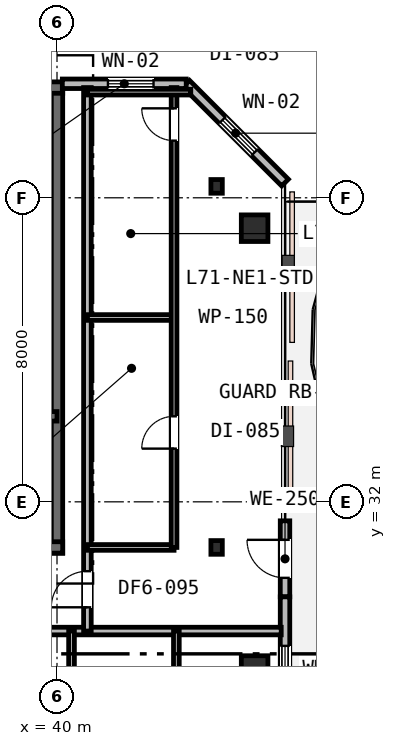
"""IFC4 building model, lengths in metres.
Left out: names, types, materials, properties, quantities, classifications, styles, units other than length and angle.
Written with IfcOpenShell. Run it as: python <this file> out.ifc"""

import sys

from ifc_helpers import new_model, si_unit, direction, frame, frame_2d, origin, origin_2d, place, context, subcontext, project, spatial, rectangle, i_section, extrude, element, fill, save


model = new_model("IFC4")
c1 = context("Model", 3, precision=1e-05, world=origin(), true_north=direction((0.0, 1.0)))
c2 = subcontext(c1, "Body", "Model", "MODEL_VIEW")
j1 = project(units=[si_unit("LENGTHUNIT", "METRE"), si_unit("PLANEANGLEUNIT", "RADIAN")], contexts=[c1])
p1 = place(None, origin())
s1 = spatial("IfcSite", under=j1, at=p1, CompositionType="ELEMENT")
p2 = place(p1, origin())
s2 = spatial("IfcBuilding", under=s1, at=p2, CompositionType="ELEMENT")
p3 = place(p2, frame((0.0, 0.0, 275.4)))
s3 = spatial("IfcBuildingStorey", under=s2, at=p3, CompositionType="ELEMENT", Elevation=275.4)
p4 = place(p3, frame((40.0, 30.65, 0.0), z_axis=(0.0, 0.0, 1.0), x_axis=(0.0, 1.0, 0.0)))
e1 = element("IfcWall", 1, at=p4, inside=s3, PredefinedType="SHEAR", context=c2, shape_type="SweptSolid", body=[
    extrude(rectangle(XDim=12.3, YDim=0.3, at=frame_2d((6.15, 0.0))), origin(), (0.0, 0.0, 1.0), 3.8),
])
p5 = place(p3, frame((15.85, 42.9, 0.0), z_axis=(0.0, 0.0, 1.0), x_axis=(1.0, 0.0, 0.0)))
e2 = element("IfcWall", 2, at=p5, inside=s3, PredefinedType="SHEAR", context=c2, shape_type="SweptSolid", body=[
    extrude(rectangle(XDim=24.3, YDim=0.3, at=frame_2d((12.15, 0.0))), origin(), (0.0, 0.0, 1.0), 3.8),
])
p6 = place(p5, frame((1.6, 0.0, 0.95)))
e3 = element("IfcOpeningElement", 3, at=p6, cuts=e2, PredefinedType="OPENING", context=c2, shape_type="SweptSolid", body=[
    extrude(rectangle(XDim=1.2, YDim=1.6, at=frame_2d((0.6, 0.8))), frame((0.0, 0.16, 0.0), z_axis=(0.0, -1.0, 0.0), x_axis=(1.0, 0.0, 0.0)), (0.0, 0.0, 1.0), 0.32),
])
p7 = place(p5, frame((16.5, 0.0, 0.95)))
e4 = element("IfcOpeningElement", 4, at=p7, cuts=e2, PredefinedType="OPENING", context=c2, shape_type="SweptSolid", body=[
    extrude(rectangle(XDim=1.2, YDim=1.6, at=frame_2d((0.6, 0.8))), frame((0.0, 0.16, 0.0), z_axis=(0.0, -1.0, 0.0), x_axis=(1.0, 0.0, 0.0)), (0.0, 0.0, 1.0), 0.32),
])
p8 = place(p5, frame((21.6, 0.0, 0.95)))
e5 = element("IfcOpeningElement", 5, at=p8, cuts=e2, PredefinedType="OPENING", context=c2, shape_type="SweptSolid", body=[
    extrude(rectangle(XDim=1.2, YDim=1.6, at=frame_2d((0.6, 0.8))), frame((0.0, 0.16, 0.0), z_axis=(0.0, -1.0, 0.0), x_axis=(1.0, 0.0, 0.0)), (0.0, 0.0, 1.0), 0.32),
])
p9 = place(p3, frame((28.95, 30.8, 0.0), z_axis=(0.0, 0.0, 1.0), x_axis=(1.0, 0.0, 0.0)))
e6 = element("IfcWall", 6, at=p9, inside=s3, PredefinedType="SHEAR", context=c2, shape_type="SweptSolid", body=[
    extrude(rectangle(XDim=11.2, YDim=0.3, at=frame_2d((5.6, 0.0))), origin(), (0.0, 0.0, 1.0), 3.8),
])
p10 = place(p9, frame((7.65, 0.0, 0.0)))
e7 = element("IfcOpeningElement", 7, at=p10, cuts=e6, PredefinedType="OPENING", context=c2, shape_type="SweptSolid", body=[
    extrude(rectangle(XDim=1.1, YDim=2.15, at=frame_2d((0.55, 1.075))), frame((0.0, 0.16, 0.0), z_axis=(0.0, -1.0, 0.0), x_axis=(1.0, 0.0, 0.0)), (0.0, 0.0, 1.0), 0.32),
])
p11 = place(p3, frame((33.95, 34.25, 0.0), z_axis=(0.0, 0.0, 1.0), x_axis=(1.0, 0.0, 0.0)))
e8 = element("IfcWall", 8, at=p11, inside=s3, PredefinedType="SHEAR", context=c2, shape_type="SweptSolid", body=[
    extrude(rectangle(XDim=6.05, YDim=0.25, at=frame_2d((3.025, 0.0))), origin(), (0.0, 0.0, 1.0), 3.8),
])
p12 = place(p11, frame((3.7, 0.0, 0.0)))
e9 = element("IfcOpeningElement", 9, at=p12, cuts=e8, PredefinedType="OPENING", context=c2, shape_type="SweptSolid", body=[
    extrude(rectangle(XDim=1.0, YDim=2.15, at=frame_2d((0.5, 1.075))), frame((0.0, 0.135, 0.0), z_axis=(0.0, -1.0, 0.0), x_axis=(1.0, 0.0, 0.0)), (0.0, 0.0, 1.0), 0.27),
])
p13 = place(p11, frame((0.55, 0.0, 0.0)))
e10 = element("IfcOpeningElement", 10, at=p13, cuts=e8, PredefinedType="OPENING", context=c2, shape_type="SweptSolid", body=[
    extrude(rectangle(XDim=1.1, YDim=2.15, at=frame_2d((0.55, 1.075))), frame((0.0, 0.135, 0.0), z_axis=(0.0, -1.0, 0.0), x_axis=(1.0, 0.0, 0.0)), (0.0, 0.0, 1.0), 0.27),
])
for number, where, z_axis, x_axis in (
    (11, (45.2, 27.6, 0.0), (0.0, 0.0, 1.0), (1.0, 0.0, 0.0)),
    (12, (45.2, 39.2, 0.0), (0.0, 0.0, 1.0), (1.0, 0.0, 0.0)),
):
    element("IfcColumn", number, at=place(p3, frame(where, z_axis=z_axis, x_axis=x_axis)), inside=s3, PredefinedType="COLUMN", context=c2, shape_type="SweptSolid", body=[
        extrude(rectangle(XDim=0.7, YDim=0.7, at=origin_2d()), origin(), (0.0, 0.0, 1.0), 3.8),
    ])
for number, where, z_axis, x_axis in (
    (13, (44.2, 30.8, 0.0), (0.0, 0.0, 1.0), (1.0, 0.0, 0.0)),
    (14, (44.2, 40.3, 0.0), (0.0, 0.0, 1.0), (1.0, 0.0, 0.0)),
):
    element("IfcColumn", number, at=place(p3, frame(where, z_axis=z_axis, x_axis=x_axis)), inside=s3, PredefinedType="COLUMN", context=c2, shape_type="SweptSolid", body=[
        extrude(i_section(OverallWidth=0.3, OverallDepth=0.36, WebThickness=0.013, FlangeThickness=0.022, FilletRadius=0.027, at=origin_2d()), origin(), (0.0, 0.0, 1.0), 3.8),
    ])
p14 = place(p3, frame((46.0, 29.5, 0.0), z_axis=(0.0, 0.0, 1.0), x_axis=(0.0, 1.0, 0.0)))
e15 = element("IfcWall", 15, at=p14, inside=s3, PredefinedType="STANDARD", context=c2, shape_type="SweptSolid", body=[
    extrude(rectangle(XDim=2.0, YDim=0.25, at=frame_2d((1.0, 0.0))), origin(), (0.0, 0.0, 1.0), 3.53),
])
p15 = place(p14, frame((0.5, 0.0, 0.0)))
e16 = element("IfcOpeningElement", 16, at=p15, cuts=e15, PredefinedType="OPENING", context=c2, shape_type="SweptSolid", body=[
    extrude(rectangle(XDim=1.0, YDim=2.15, at=frame_2d((0.5, 1.075))), frame((0.0, 0.135, 0.0), z_axis=(0.0, -1.0, 0.0), x_axis=(1.0, 0.0, 0.0)), (0.0, 0.0, 1.0), 0.27),
])
p16 = place(p3, frame((46.0, 26.6, 0.0), z_axis=(0.0, 0.0, 1.0), x_axis=(0.0, 1.0, 0.0)))
e17 = element("IfcWall", 17, at=p16, inside=s3, PredefinedType="STANDARD", context=c2, shape_type="SweptSolid", body=[
    extrude(rectangle(XDim=2.9, YDim=0.25, at=frame_2d((1.45, 0.0))), origin(), (0.0, 0.0, 1.0), 3.53),
])
p17 = place(p16, frame((0.41, 0.0, 0.85)))
e18 = element("IfcOpeningElement", 18, at=p17, cuts=e17, PredefinedType="OPENING", context=c2, shape_type="SweptSolid", body=[
    extrude(rectangle(XDim=1.2, YDim=1.6, at=frame_2d((0.6, 0.8))), frame((0.0, 0.135, 0.0), z_axis=(0.0, -1.0, 0.0), x_axis=(1.0, 0.0, 0.0)), (0.0, 0.0, 1.0), 0.27),
])
p18 = place(p3, frame((46.0, 40.4, 0.0), z_axis=(0.0, 0.0, 1.0), x_axis=(-0.707106781187, 0.707106781187, 0.0)))
e19 = element("IfcWall", 19, at=p18, inside=s3, PredefinedType="STANDARD", context=c2, shape_type="SweptSolid", body=[
    extrude(rectangle(XDim=3.677, YDim=0.25, at=frame_2d((1.839, 0.0))), origin(), (0.0, 0.0, 1.0), 3.53),
])
p19 = place(p18, frame((1.128, 0.0, 0.85)))
e20 = element("IfcOpeningElement", 20, at=p19, cuts=e19, PredefinedType="OPENING", context=c2, shape_type="SweptSolid", body=[
    extrude(rectangle(XDim=1.2, YDim=1.6, at=frame_2d((0.6, 0.8))), frame((0.0, 0.135, 0.0), z_axis=(0.0, -1.0, 0.0), x_axis=(1.0, 0.0, 0.0)), (0.0, 0.0, 1.0), 0.27),
])
p20 = place(p3, frame((43.4, 43.0, 0.0), z_axis=(0.0, 0.0, 1.0), x_axis=(-1.0, 0.0, 0.0)))
e21 = element("IfcWall", 21, at=p20, inside=s3, PredefinedType="STANDARD", context=c2, shape_type="SweptSolid", body=[
    extrude(rectangle(XDim=3.26, YDim=0.25, at=frame_2d((1.63, 0.0))), origin(), (0.0, 0.0, 1.0), 3.53),
])
p21 = place(p20, frame((0.86, 0.0, 0.85)))
e22 = element("IfcOpeningElement", 22, at=p21, cuts=e21, PredefinedType="OPENING", context=c2, shape_type="SweptSolid", body=[
    extrude(rectangle(XDim=1.2, YDim=1.6, at=frame_2d((0.6, 0.8))), frame((0.0, 0.135, 0.0), z_axis=(0.0, -1.0, 0.0), x_axis=(1.0, 0.0, 0.0)), (0.0, 0.0, 1.0), 0.27),
])
p22 = place(p3, frame((14.2, 28.6, 0.0), z_axis=(0.0, 0.0, 1.0), x_axis=(1.0, 0.0, 0.0)))
e23 = element("IfcWall", 23, at=p22, inside=s3, PredefinedType="PARTITIONING", context=c2, shape_type="SweptSolid", body=[
    extrude(rectangle(XDim=31.7, YDim=0.2, at=frame_2d((15.85, 0.0))), origin(), (0.0, 0.0, 1.0), 3.16),
])
p23 = place(p22, frame((12.625, 0.0, 0.0)))
e24 = element("IfcOpeningElement", 24, at=p23, cuts=e23, PredefinedType="OPENING", context=c2, shape_type="SweptSolid", body=[
    extrude(rectangle(XDim=0.95, YDim=2.15, at=frame_2d((0.475, 1.075))), frame((0.0, 0.11, 0.0), z_axis=(0.0, -1.0, 0.0), x_axis=(1.0, 0.0, 0.0)), (0.0, 0.0, 1.0), 0.22),
])
p24 = place(p22, frame((19.125, 0.0, 0.0)))
e25 = element("IfcOpeningElement", 25, at=p24, cuts=e23, PredefinedType="OPENING", context=c2, shape_type="SweptSolid", body=[
    extrude(rectangle(XDim=0.95, YDim=2.15, at=frame_2d((0.475, 1.075))), frame((0.0, 0.11, 0.0), z_axis=(0.0, -1.0, 0.0), x_axis=(1.0, 0.0, 0.0)), (0.0, 0.0, 1.0), 0.22),
])
p25 = place(p22, frame((24.016, 0.0, 0.0)))
e26 = element("IfcOpeningElement", 26, at=p25, cuts=e23, PredefinedType="OPENING", context=c2, shape_type="SweptSolid", body=[
    extrude(rectangle(XDim=0.95, YDim=2.15, at=frame_2d((0.475, 1.075))), frame((0.0, 0.11, 0.0), z_axis=(0.0, -1.0, 0.0), x_axis=(1.0, 0.0, 0.0)), (0.0, 0.0, 1.0), 0.22),
])
p26 = place(p3, frame((40.8, 28.6, 0.0), z_axis=(0.0, 0.0, 1.0), x_axis=(0.0, 1.0, 0.0)))
e27 = element("IfcWall", 27, at=p26, inside=s3, PredefinedType="PARTITIONING", context=c2, shape_type="SweptSolid", body=[
    extrude(rectangle(XDim=14.3, YDim=0.2, at=frame_2d((7.15, 0.0))), origin(), (0.0, 0.0, 1.0), 3.16),
])
p27 = place(p26, frame((0.625, 0.0, 0.0)))
e28 = element("IfcOpeningElement", 28, at=p27, cuts=e27, PredefinedType="OPENING", context=c2, shape_type="SweptSolid", body=[
    extrude(rectangle(XDim=0.95, YDim=2.15, at=frame_2d((0.475, 1.075))), frame((0.0, 0.11, 0.0), z_axis=(0.0, -1.0, 0.0), x_axis=(1.0, 0.0, 0.0)), (0.0, 0.0, 1.0), 0.22),
])
p28 = place(p3, frame((40.8, 30.8, 0.0), z_axis=(0.0, 0.0, 1.0), x_axis=(1.0, 0.0, 0.0)))
e29 = element("IfcWall", 29, at=p28, inside=s3, PredefinedType="PARTITIONING", context=c2, shape_type="SweptSolid", body=[
    extrude(rectangle(XDim=2.28, YDim=0.15, at=frame_2d((1.14, 0.0))), origin(), (0.0, 0.0, 1.0), 3.16),
])
p29 = place(p3, frame((40.8, 36.85, 0.0), z_axis=(0.0, 0.0, 1.0), x_axis=(1.0, 0.0, 0.0)))
e30 = element("IfcWall", 30, at=p29, inside=s3, PredefinedType="PARTITIONING", context=c2, shape_type="SweptSolid", body=[
    extrude(rectangle(XDim=2.28, YDim=0.15, at=frame_2d((1.14, 0.0))), origin(), (0.0, 0.0, 1.0), 3.53),
])
p30 = place(p3, frame((43.08, 30.8, 0.0), z_axis=(0.0, 0.0, 1.0), x_axis=(0.0, 1.0, 0.0)))
e31 = element("IfcWall", 31, at=p30, inside=s3, PredefinedType="PARTITIONING", context=c2, shape_type="SweptSolid", body=[
    extrude(rectangle(XDim=12.1, YDim=0.15, at=frame_2d((6.05, 0.0))), origin(), (0.0, 0.0, 1.0), 3.16),
])
p31 = place(p30, frame((2.6, 0.0, 0.0)))
e32 = element("IfcOpeningElement", 32, at=p31, cuts=e31, PredefinedType="OPENING", context=c2, shape_type="SweptSolid", body=[
    extrude(rectangle(XDim=0.85, YDim=2.15, at=frame_2d((0.425, 1.075))), frame((0.0, 0.085, 0.0), z_axis=(0.0, -1.0, 0.0), x_axis=(1.0, 0.0, 0.0)), (0.0, 0.0, 1.0), 0.17),
])
p32 = place(p30, frame((10.704, 0.0, 0.0)))
e33 = element("IfcOpeningElement", 33, at=p32, cuts=e31, PredefinedType="OPENING", context=c2, shape_type="SweptSolid", body=[
    extrude(rectangle(XDim=0.85, YDim=2.15, at=frame_2d((0.425, 1.075))), frame((0.0, 0.085, 0.0), z_axis=(0.0, -1.0, 0.0), x_axis=(1.0, 0.0, 0.0)), (0.0, 0.0, 1.0), 0.17),
])
p33 = place(p3, frame((40.8, 42.78, 0.0), z_axis=(0.0, 0.0, 1.0), x_axis=(1.0, 0.0, 0.0)))
e34 = element("IfcWall", 34, at=p33, inside=s3, PredefinedType="PARTITIONING", context=c2, shape_type="SweptSolid", body=[
    extrude(rectangle(XDim=2.72, YDim=0.15, at=frame_2d((1.36, 0.0))), origin(), (0.0, 0.0, 1.0), 3.53),
])
for number, where, z_axis, x_axis in (
    (35, (40.382, 26.576, 0.0), (0.0, 0.0, 1.0), (0.0, 1.0, 0.0)),
    (36, (43.141, 26.576, 0.0), (0.0, 0.0, 1.0), (0.0, 1.0, 0.0)),
):
    element("IfcWall", number, at=place(p3, frame(where, z_axis=z_axis, x_axis=x_axis)), inside=s3, PredefinedType="PARTITIONING", context=c2, shape_type="SweptSolid", body=[
        extrude(rectangle(XDim=2.024, YDim=0.15, at=frame_2d((1.012, 0.0))), origin(), (0.0, 0.0, 1.0), 3.53),
    ])
p34 = place(p15, origin())
e37 = element("IfcDoor", 37, at=p34, inside=s3, OperationType="SINGLE_SWING_RIGHT", PredefinedType="DOOR", context=c2, shape_type="SweptSolid", body=[
    extrude(rectangle(XDim=1.0, YDim=2.15, at=frame_2d((0.5, 1.075))), frame((0.0, 0.025, 0.0), z_axis=(0.0, -1.0, 0.0), x_axis=(1.0, 0.0, 0.0)), (0.0, 0.0, 1.0), 0.05),
])
fill(e16, e37)
p35 = place(p17, origin())
e38 = element("IfcWindow", 38, at=p35, inside=s3, PartitioningType="SINGLE_PANEL", PredefinedType="WINDOW", context=c2, shape_type="SweptSolid", body=[
    extrude(rectangle(XDim=1.2, YDim=1.6, at=frame_2d((0.6, 0.8))), frame((0.0, 0.03, 0.0), z_axis=(0.0, -1.0, 0.0), x_axis=(1.0, 0.0, 0.0)), (0.0, 0.0, 1.0), 0.06),
])
fill(e18, e38)
p36 = place(p19, origin())
e39 = element("IfcWindow", 39, at=p36, inside=s3, PartitioningType="SINGLE_PANEL", PredefinedType="WINDOW", context=c2, shape_type="SweptSolid", body=[
    extrude(rectangle(XDim=1.2, YDim=1.6, at=frame_2d((0.6, 0.8))), frame((0.0, 0.03, 0.0), z_axis=(0.0, -1.0, 0.0), x_axis=(1.0, 0.0, 0.0)), (0.0, 0.0, 1.0), 0.06),
])
fill(e20, e39)
p37 = place(p21, origin())
e40 = element("IfcWindow", 40, at=p37, inside=s3, PartitioningType="SINGLE_PANEL", PredefinedType="WINDOW", context=c2, shape_type="SweptSolid", body=[
    extrude(rectangle(XDim=1.2, YDim=1.6, at=frame_2d((0.6, 0.8))), frame((0.0, 0.03, 0.0), z_axis=(0.0, -1.0, 0.0), x_axis=(1.0, 0.0, 0.0)), (0.0, 0.0, 1.0), 0.06),
])
fill(e22, e40)
p38 = place(p27, origin())
e41 = element("IfcDoor", 41, at=p38, inside=s3, OperationType="SINGLE_SWING_LEFT", PredefinedType="DOOR", context=c2, shape_type="SweptSolid", body=[
    extrude(rectangle(XDim=0.95, YDim=2.15, at=frame_2d((0.475, 1.075))), frame((0.0, 0.025, 0.0), z_axis=(0.0, -1.0, 0.0), x_axis=(1.0, 0.0, 0.0)), (0.0, 0.0, 1.0), 0.05),
])
fill(e28, e41)
p39 = place(p31, origin())
e42 = element("IfcDoor", 42, at=p39, inside=s3, OperationType="SINGLE_SWING_LEFT", PredefinedType="DOOR", context=c2, shape_type="SweptSolid", body=[
    extrude(rectangle(XDim=0.85, YDim=2.15, at=frame_2d((0.425, 1.075))), frame((0.0, 0.025, 0.0), z_axis=(0.0, -1.0, 0.0), x_axis=(1.0, 0.0, 0.0)), (0.0, 0.0, 1.0), 0.05),
])
fill(e32, e42)
p40 = place(p32, origin())
e43 = element("IfcDoor", 43, at=p40, inside=s3, OperationType="SINGLE_SWING_RIGHT", PredefinedType="DOOR", context=c2, shape_type="SweptSolid", body=[
    extrude(rectangle(XDim=0.85, YDim=2.15, at=frame_2d((0.425, 1.075))), frame((0.0, 0.025, 0.0), z_axis=(0.0, -1.0, 0.0), x_axis=(1.0, 0.0, 0.0)), (0.0, 0.0, 1.0), 0.05),
])
fill(e33, e43)
save(model, sys.argv[1])
